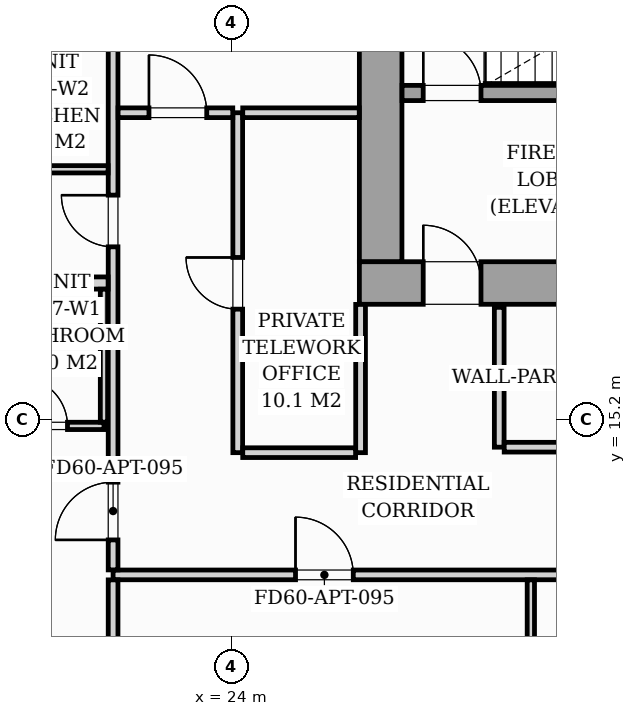
"""IFC4 building model, lengths in metres.
Left out: names, types, materials, properties, quantities, classifications, styles, units other than length and angle.
Written with IfcOpenShell. Run it as: python <this file> out.ifc"""

import sys

from ifc_helpers import new_model, si_unit, direction, frame, frame_2d, origin, origin_2d, place, context, subcontext, project, spatial, rectangle, i_section, extrude, source, transform, mapped, element, fill, save


model = new_model("IFC4")
c1 = context("Model", 3, precision=1e-05, world=origin(), true_north=direction((0.0, 1.0)))
c2 = subcontext(c1, "Body", "Model", "MODEL_VIEW")
j1 = project(units=[si_unit("LENGTHUNIT", "METRE"), si_unit("PLANEANGLEUNIT", "RADIAN")], contexts=[c1])
p1 = place(None, origin())
s1 = spatial("IfcSite", under=j1, at=p1, CompositionType="ELEMENT")
p2 = place(p1, origin())
s2 = spatial("IfcBuilding", under=s1, at=p2, CompositionType="ELEMENT")
p3 = place(p2, frame((0.0, 0.0, 131.0)))
s3 = spatial("IfcBuildingStorey", under=s2, at=p3, CompositionType="ELEMENT", Elevation=131.0)
m1 = source(origin(), c2, "Body", "SweptSolid", [
    extrude(i_section(OverallWidth=0.421, OverallDepth=0.465, WebThickness=0.045, FlangeThickness=0.073, FilletRadius=0.018, at=origin_2d()), origin(), (0.0, 0.0, 1.0), 3.196),
])
p4 = place(p3, frame((26.4, 17.4, 0.002), z_axis=(0.0, 0.0, 1.0), x_axis=(1.0, 0.0, 0.0)))
e1 = element("IfcColumn", 1, at=p4, inside=s3, PredefinedType="PILASTER", context=c2, shape_type="MappedRepresentation", body=[
    mapped(m1, transform((0.0, 0.0, 0.0), scale=1.0)),
])
p5 = place(p3, frame((26.1, 17.45, 0.0), z_axis=(0.0, 0.0, 1.0), x_axis=(1.0, 0.0, 0.0)))
e2 = element("IfcWall", 2, at=p5, inside=s3, PredefinedType="SHEAR", context=c2, shape_type="SweptSolid", body=[
    extrude(rectangle(XDim=19.8, YDim=0.7, at=frame_2d((9.9, 0.0))), origin(), (0.0, 0.0, 1.0), 3.2),
])
p6 = place(p5, frame((1.05, 0.0, 0.0)))
e3 = element("IfcOpeningElement", 3, at=p6, cuts=e2, PredefinedType="OPENING", context=c2, shape_type="SweptSolid", body=[
    extrude(rectangle(XDim=0.95, YDim=2.06, at=frame_2d((0.475, 1.03))), frame((0.0, 0.36, 0.0), z_axis=(0.0, -1.0, 0.0), x_axis=(1.0, 0.0, 0.0)), (0.0, 0.0, 1.0), 0.72),
])
p7 = place(p5, frame((9.48, 0.0, 0.0)))
e4 = element("IfcOpeningElement", 4, at=p7, cuts=e2, PredefinedType="OPENING", context=c2, shape_type="SweptSolid", body=[
    extrude(rectangle(XDim=0.85, YDim=2.0, at=frame_2d((0.425, 1.0))), frame((0.0, 0.36, 0.0), z_axis=(0.0, -1.0, 0.0), x_axis=(1.0, 0.0, 0.0)), (0.0, 0.0, 1.0), 0.72),
])
p8 = place(p5, frame((17.65, 0.0, 0.0)))
e5 = element("IfcOpeningElement", 5, at=p8, cuts=e2, PredefinedType="OPENING", context=c2, shape_type="SweptSolid", body=[
    extrude(rectangle(XDim=0.95, YDim=2.06, at=frame_2d((0.475, 1.03))), frame((0.0, 0.36, 0.0), z_axis=(0.0, -1.0, 0.0), x_axis=(1.0, 0.0, 0.0)), (0.0, 0.0, 1.0), 0.72),
])
p9 = place(p3, frame((26.45, 17.802, 0.0), z_axis=(0.0, 0.0, 1.0), x_axis=(0.0, 1.0, 0.0)))
e6 = element("IfcWall", 6, at=p9, inside=s3, PredefinedType="SHEAR", context=c2, shape_type="SweptSolid", body=[
    extrude(rectangle(XDim=5.796, YDim=0.7, at=frame_2d((2.898, 0.0))), origin(), (0.0, 0.0, 1.0), 3.2),
])
p10 = place(p3, frame((26.802, 20.575, 0.0), z_axis=(0.0, 0.0, 1.0), x_axis=(1.0, 0.0, 0.0)))
e7 = element("IfcWall", 7, at=p10, inside=s3, PredefinedType="SOLIDWALL", context=c2, shape_type="SweptSolid", body=[
    extrude(rectangle(XDim=8.148, YDim=0.25, at=frame_2d((4.074, 0.0))), origin(), (0.0, 0.0, 1.0), 3.2),
])
p11 = place(p10, frame((0.348, 0.0, 0.0)))
e8 = element("IfcOpeningElement", 8, at=p11, cuts=e7, PredefinedType="OPENING", context=c2, shape_type="SweptSolid", body=[
    extrude(rectangle(XDim=0.95, YDim=2.06, at=frame_2d((0.475, 1.03))), frame((0.0, 0.135, 0.0), z_axis=(0.0, -1.0, 0.0), x_axis=(1.0, 0.0, 0.0)), (0.0, 0.0, 1.0), 0.27),
])
p12 = place(p3, frame((28.4, 14.75, 0.0), z_axis=(0.0, 0.0, 1.0), x_axis=(0.0, 1.0, 0.0)))
e9 = element("IfcWall", 9, at=p12, inside=s3, PredefinedType="PARTITIONING", context=c2, shape_type="SweptSolid", body=[
    extrude(rectangle(XDim=2.3, YDim=0.16, at=frame_2d((1.15, 0.0))), origin(), (0.0, 0.0, 1.0), 2.94),
])
p13 = place(p3, frame((28.482, 14.75, 0.0), z_axis=(0.0, 0.0, 1.0), x_axis=(1.0, 0.0, 0.0)))
e10 = element("IfcWall", 10, at=p13, inside=s3, PredefinedType="PARTITIONING", context=c2, shape_type="SweptSolid", body=[
    extrude(rectangle(XDim=4.516, YDim=0.16, at=frame_2d((2.258, 0.0))), origin(), (0.0, 0.0, 1.0), 2.94),
])
p14 = place(p13, frame((1.868, 0.0, 0.0)))
e11 = element("IfcOpeningElement", 11, at=p14, cuts=e10, PredefinedType="OPENING", context=c2, shape_type="SweptSolid", body=[
    extrude(rectangle(XDim=0.8, YDim=2.05, at=frame_2d((0.4, 1.025))), frame((0.0, 0.09, 0.0), z_axis=(0.0, -1.0, 0.0), x_axis=(1.0, 0.0, 0.0)), (0.0, 0.0, 1.0), 0.18),
])
p15 = place(p3, frame((22.05, 12.65, 0.0), z_axis=(0.0, 0.0, 1.0), x_axis=(1.0, 0.0, 0.0)))
e12 = element("IfcWall", 12, at=p15, inside=s3, PredefinedType="PARTITIONING", context=c2, shape_type="SweptSolid", body=[
    extrude(rectangle(XDim=23.83, YDim=0.16, at=frame_2d((11.915, 0.0))), origin(), (0.0, 0.0, 1.0), 2.94),
])
p16 = place(p15, frame((3.0, 0.0, 0.0)))
e13 = element("IfcOpeningElement", 13, at=p16, cuts=e12, PredefinedType="OPENING", context=c2, shape_type="SweptSolid", body=[
    extrude(rectangle(XDim=0.95, YDim=2.06, at=frame_2d((0.475, 1.03))), frame((0.0, 0.09, 0.0), z_axis=(0.0, -1.0, 0.0), x_axis=(1.0, 0.0, 0.0)), (0.0, 0.0, 1.0), 0.18),
])
p17 = place(p15, frame((15.485, 0.0, 0.0)))
e14 = element("IfcOpeningElement", 14, at=p17, cuts=e12, PredefinedType="OPENING", context=c2, shape_type="SweptSolid", body=[
    extrude(rectangle(XDim=0.95, YDim=2.06, at=frame_2d((0.475, 1.03))), frame((0.0, 0.09, 0.0), z_axis=(0.0, -1.0, 0.0), x_axis=(1.0, 0.0, 0.0)), (0.0, 0.0, 1.0), 0.18),
])
p18 = place(p3, frame((22.05, 8.253, 0.0), z_axis=(0.0, 0.0, 1.0), x_axis=(0.0, 1.0, 0.0)))
e15 = element("IfcWall", 15, at=p18, inside=s3, PredefinedType="PARTITIONING", context=c2, shape_type="SweptSolid", body=[
    extrude(rectangle(XDim=4.315, YDim=0.16, at=frame_2d((2.157, 0.0))), origin(), (0.0, 0.0, 1.0), 2.94),
])
p19 = place(p3, frame((22.05, 12.732, 0.0), z_axis=(0.0, 0.0, 1.0), x_axis=(0.0, 1.0, 0.0)))
e16 = element("IfcWall", 16, at=p19, inside=s3, PredefinedType="PARTITIONING", context=c2, shape_type="SweptSolid", body=[
    extrude(rectangle(XDim=14.685, YDim=0.16, at=frame_2d((7.343, 0.0))), origin(), (0.0, 0.0, 1.0), 2.94),
])
p20 = place(p19, frame((0.493, 0.0, 0.0)))
e17 = element("IfcOpeningElement", 17, at=p20, cuts=e16, PredefinedType="OPENING", context=c2, shape_type="SweptSolid", body=[
    extrude(rectangle(XDim=0.95, YDim=2.06, at=frame_2d((0.475, 1.03))), frame((0.0, 0.09, 0.0), z_axis=(0.0, -1.0, 0.0), x_axis=(1.0, 0.0, 0.0)), (0.0, 0.0, 1.0), 0.18),
])
p21 = place(p19, frame((5.313, 0.0, 0.0)))
e18 = element("IfcOpeningElement", 18, at=p21, cuts=e16, PredefinedType="OPENING", context=c2, shape_type="SweptSolid", body=[
    extrude(rectangle(XDim=0.85, YDim=2.0, at=frame_2d((0.425, 1.0))), frame((0.0, 0.09, 0.0), z_axis=(0.0, -1.0, 0.0), x_axis=(1.0, 0.0, 0.0)), (0.0, 0.0, 1.0), 0.18),
])
p22 = place(p3, frame((28.92, 10.462, 0.0), z_axis=(0.0, 0.0, 1.0), x_axis=(0.0, 1.0, 0.0)))
e19 = element("IfcWall", 19, at=p22, inside=s3, PredefinedType="PARTITIONING", context=c2, shape_type="SweptSolid", body=[
    extrude(rectangle(XDim=2.106, YDim=0.12, at=frame_2d((1.053, 0.0))), origin(), (0.0, 0.0, 1.0), 2.94),
])
p23 = place(p3, frame((6.019, 17.45, 0.0), z_axis=(0.0, 0.0, 1.0), x_axis=(1.0, 0.0, 0.0)))
e20 = element("IfcWall", 20, at=p23, inside=s3, PredefinedType="PARTITIONING", context=c2, shape_type="SweptSolid", body=[
    extrude(rectangle(XDim=15.949, YDim=0.2, at=frame_2d((7.975, 0.0))), origin(), (0.0, 0.0, 1.0), 2.94),
])
p24 = place(p3, frame((17.7, 15.1, 0.0), z_axis=(0.0, 0.0, 1.0), x_axis=(1.0, 0.0, 0.0)))
e21 = element("IfcWall", 21, at=p24, inside=s3, PredefinedType="PARTITIONING", context=c2, shape_type="SweptSolid", body=[
    extrude(rectangle(XDim=4.2, YDim=0.12, at=frame_2d((2.1, 0.0))), origin(), (0.0, 0.0, 1.0), 2.94),
])
p25 = place(p24, frame((0.675, 0.0, 0.0)))
e22 = element("IfcOpeningElement", 22, at=p25, cuts=e21, PredefinedType="OPENING", context=c2, shape_type="SweptSolid", body=[
    extrude(rectangle(XDim=0.85, YDim=2.05, at=frame_2d((0.425, 1.025))), frame((0.0, 0.07, 0.0), z_axis=(0.0, -1.0, 0.0), x_axis=(1.0, 0.0, 0.0)), (0.0, 0.0, 1.0), 0.14),
])
p26 = place(p24, frame((2.8, 0.0, 0.0)))
e23 = element("IfcOpeningElement", 23, at=p26, cuts=e21, PredefinedType="OPENING", context=c2, shape_type="SweptSolid", body=[
    extrude(rectangle(XDim=0.8, YDim=2.02, at=frame_2d((0.4, 1.01))), frame((0.0, 0.07, 0.0), z_axis=(0.0, -1.0, 0.0), x_axis=(1.0, 0.0, 0.0)), (0.0, 0.0, 1.0), 0.14),
])
p27 = place(p3, frame((21.9, 15.162, 0.0), z_axis=(0.0, 0.0, 1.0), x_axis=(0.0, 1.0, 0.0)))
e24 = element("IfcWall", 24, at=p27, inside=s3, PredefinedType="PARTITIONING", context=c2, shape_type="SweptSolid", body=[
    extrude(rectangle(XDim=2.186, YDim=0.12, at=frame_2d((1.093, 0.0))), origin(), (0.0, 0.0, 1.0), 2.94),
])
p28 = place(p3, frame((19.712, 19.32, 0.0), z_axis=(0.0, 0.0, 1.0), x_axis=(1.0, 0.0, 0.0)))
e25 = element("IfcWall", 25, at=p28, inside=s3, PredefinedType="PARTITIONING", context=c2, shape_type="SweptSolid", body=[
    extrude(rectangle(XDim=2.256, YDim=0.12, at=frame_2d((1.128, 0.0))), origin(), (0.0, 0.0, 1.0), 2.94),
])
p29 = place(p3, frame((24.1, 14.66, 0.0), z_axis=(0.0, 0.0, 1.0), x_axis=(0.0, 1.0, 0.0)))
e26 = element("IfcWall", 26, at=p29, inside=s3, PredefinedType="PARTITIONING", context=c2, shape_type="SweptSolid", body=[
    extrude(rectangle(XDim=5.59, YDim=0.16, at=frame_2d((2.795, 0.0))), origin(), (0.0, 0.0, 1.0), 2.94),
])
p30 = place(p29, frame((2.36, 0.0, 0.0)))
e27 = element("IfcOpeningElement", 27, at=p30, cuts=e26, PredefinedType="OPENING", context=c2, shape_type="SweptSolid", body=[
    extrude(rectangle(XDim=0.85, YDim=2.0, at=frame_2d((0.425, 1.0))), frame((0.0, 0.09, 0.0), z_axis=(0.0, -1.0, 0.0), x_axis=(1.0, 0.0, 0.0)), (0.0, 0.0, 1.0), 0.18),
])
p31 = place(p3, frame((22.132, 20.25, 0.0), z_axis=(0.0, 0.0, 1.0), x_axis=(1.0, 0.0, 0.0)))
e28 = element("IfcWall", 28, at=p31, inside=s3, PredefinedType="PARTITIONING", context=c2, shape_type="SweptSolid", body=[
    extrude(rectangle(XDim=1.886, YDim=0.16, at=frame_2d((0.943, 0.0))), origin(), (0.0, 0.0, 1.0), 2.94),
])
p32 = place(p31, frame((0.508, 0.0, 0.0)))
e29 = element("IfcOpeningElement", 29, at=p32, cuts=e28, PredefinedType="OPENING", context=c2, shape_type="SweptSolid", body=[
    extrude(rectangle(XDim=0.95, YDim=2.06, at=frame_2d((0.475, 1.03))), frame((0.0, 0.09, 0.0), z_axis=(0.0, -1.0, 0.0), x_axis=(1.0, 0.0, 0.0)), (0.0, 0.0, 1.0), 0.18),
])
p33 = place(p3, frame((24.182, 20.25, 0.0), z_axis=(0.0, 0.0, 1.0), x_axis=(1.0, 0.0, 0.0)))
e30 = element("IfcWall", 30, at=p33, inside=s3, PredefinedType="PARTITIONING", context=c2, shape_type="SweptSolid", body=[
    extrude(rectangle(XDim=1.916, YDim=0.16, at=frame_2d((0.958, 0.0))), origin(), (0.0, 0.0, 1.0), 2.94),
])
p34 = place(p3, frame((26.12, 14.66, 0.0), z_axis=(0.0, 0.0, 1.0), x_axis=(0.0, 1.0, 0.0)))
e31 = element("IfcWall", 31, at=p34, inside=s3, PredefinedType="PARTITIONING", context=c2, shape_type="SweptSolid", body=[
    extrude(rectangle(XDim=2.438, YDim=0.16, at=frame_2d((1.219, 0.0))), origin(), (0.0, 0.0, 1.0), 2.94),
])
p35 = place(p3, frame((24.182, 14.66, 0.0), z_axis=(0.0, 0.0, 1.0), x_axis=(1.0, 0.0, 0.0)))
e32 = element("IfcWall", 32, at=p35, inside=s3, PredefinedType="PARTITIONING", context=c2, shape_type="SweptSolid", body=[
    extrude(rectangle(XDim=1.856, YDim=0.16, at=frame_2d((0.928, 0.0))), origin(), (0.0, 0.0, 1.0), 2.94),
])
m2 = source(origin(), c2, "Body", "SweptSolid", [
    extrude(rectangle(XDim=0.95, YDim=2.06, at=frame_2d((0.475, 1.03))), frame((0.0, 0.025, 0.0), z_axis=(0.0, -1.0, 0.0), x_axis=(1.0, 0.0, 0.0)), (0.0, 0.0, 1.0), 0.05),
])
p36 = place(p6, origin())
e33 = element("IfcDoor", 33, at=p36, inside=s3, OperationType="SINGLE_SWING_LEFT", PredefinedType="DOOR", context=c2, shape_type="MappedRepresentation", body=[
    mapped(m2, transform((0.0, 0.0, 0.0), scale=1.0)),
])
fill(e3, e33)
p37 = place(p11, origin())
e34 = element("IfcDoor", 34, at=p37, inside=s3, OperationType="SINGLE_SWING_LEFT", PredefinedType="DOOR", context=c2, shape_type="MappedRepresentation", body=[
    mapped(m2, transform((0.0, 0.0, 0.0), scale=1.0)),
])
fill(e8, e34)
m3 = source(origin(), c2, "Body", "SweptSolid", [
    extrude(rectangle(XDim=0.95, YDim=2.06, at=frame_2d((0.475, 1.03))), frame((0.0, 0.025, 0.0), z_axis=(0.0, -1.0, 0.0), x_axis=(1.0, 0.0, 0.0)), (0.0, 0.0, 1.0), 0.05),
])
p38 = place(p16, origin())
e35 = element("IfcDoor", 35, at=p38, inside=s3, OperationType="SINGLE_SWING_LEFT", PredefinedType="DOOR", context=c2, shape_type="MappedRepresentation", body=[
    mapped(m3, transform((0.0, 0.0, 0.0), scale=1.0)),
])
fill(e13, e35)
p39 = place(p20, origin())
e36 = element("IfcDoor", 36, at=p39, inside=s3, OperationType="SINGLE_SWING_LEFT", PredefinedType="DOOR", context=c2, shape_type="MappedRepresentation", body=[
    mapped(m3, transform((0.0, 0.0, 0.0), scale=1.0)),
])
fill(e17, e36)
m4 = source(origin(), c2, "Body", "SweptSolid", [
    extrude(rectangle(XDim=0.8, YDim=2.02, at=frame_2d((0.4, 1.01))), frame((0.0, 0.025, 0.0), z_axis=(0.0, -1.0, 0.0), x_axis=(1.0, 0.0, 0.0)), (0.0, 0.0, 1.0), 0.05),
])
p40 = place(p26, origin())
e37 = element("IfcDoor", 37, at=p40, inside=s3, OperationType="SINGLE_SWING_LEFT", PredefinedType="DOOR", context=c2, shape_type="MappedRepresentation", body=[
    mapped(m4, transform((0.0, 0.0, 0.0), scale=1.0)),
])
fill(e23, e37)
m5 = source(origin(), c2, "Body", "SweptSolid", [
    extrude(rectangle(XDim=0.85, YDim=2.0, at=frame_2d((0.425, 1.0))), frame((0.0, 0.025, 0.0), z_axis=(0.0, -1.0, 0.0), x_axis=(1.0, 0.0, 0.0)), (0.0, 0.0, 1.0), 0.05),
])
p41 = place(p21, origin())
e38 = element("IfcDoor", 38, at=p41, inside=s3, OperationType="SINGLE_SWING_RIGHT", PredefinedType="DOOR", context=c2, shape_type="MappedRepresentation", body=[
    mapped(m5, transform((0.0, 0.0, 0.0), scale=1.0)),
])
fill(e18, e38)
p42 = place(p30, origin())
e39 = element("IfcDoor", 39, at=p42, inside=s3, OperationType="SINGLE_SWING_RIGHT", PredefinedType="DOOR", context=c2, shape_type="MappedRepresentation", body=[
    mapped(m5, transform((0.0, 0.0, 0.0), scale=1.0)),
])
fill(e27, e39)
p43 = place(p32, origin())
e40 = element("IfcDoor", 40, at=p43, inside=s3, OperationType="SINGLE_SWING_LEFT", PredefinedType="DOOR", context=c2, shape_type="MappedRepresentation", body=[
    mapped(m3, transform((0.0, 0.0, 0.0), scale=1.0)),
])
fill(e29, e40)
save(model, sys.argv[1])
